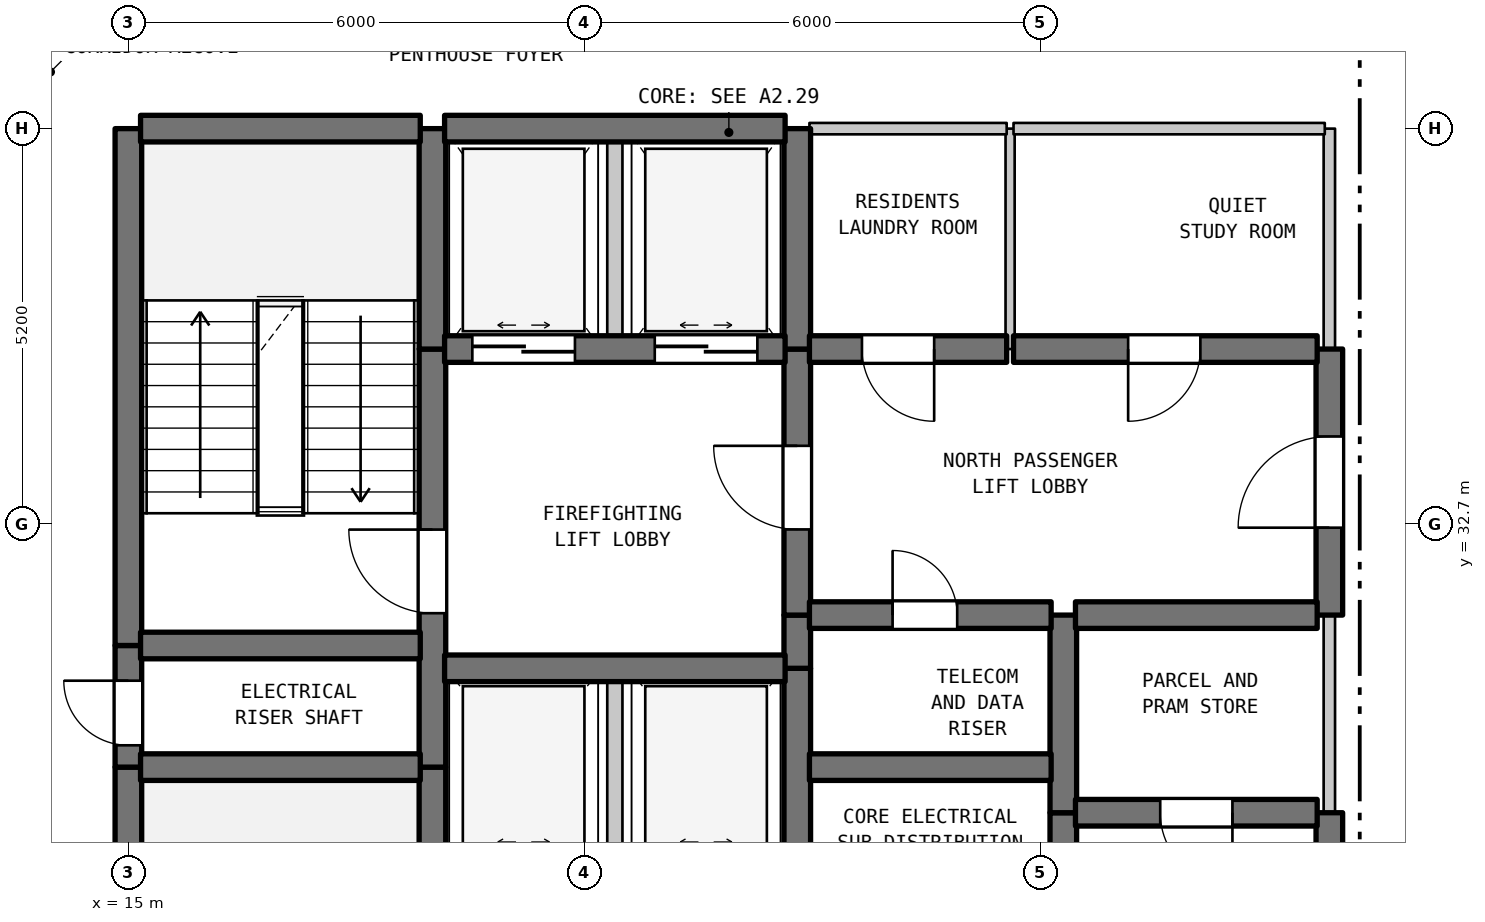
"""IFC4 building model, lengths in metres.
Left out: names, types, materials, properties, quantities, classifications, styles, units other than length and angle.
Written with IfcOpenShell. Run it as: python <this file> out.ifc"""

import sys

from ifc_helpers import new_model, si_unit, direction, frame, frame_2d, origin, place, context, subcontext, project, spatial, rectangle, extrude, element, fill, save


model = new_model("IFC4")
c1 = context("Model", 3, precision=1e-05, world=origin(), true_north=direction((0.0, 1.0)))
c2 = subcontext(c1, "Body", "Model", "MODEL_VIEW")
j1 = project(units=[si_unit("LENGTHUNIT", "METRE"), si_unit("PLANEANGLEUNIT", "RADIAN")], contexts=[c1])
p1 = place(None, origin())
s1 = spatial("IfcSite", under=j1, at=p1, CompositionType="ELEMENT")
p2 = place(p1, origin())
s2 = spatial("IfcBuilding", under=s1, at=p2, CompositionType="ELEMENT")
p3 = place(p2, frame((0.0, 0.0, 307.3)))
s3 = spatial("IfcBuildingStorey", under=s2, at=p3, CompositionType="ELEMENT", Elevation=307.3)
p4 = place(p3, frame((15.0, 22.7, 0.0), z_axis=(0.0, 0.0, 1.0), x_axis=(0.0, 1.0, 0.0)))
e1 = element("IfcWall", 1, at=p4, inside=s3, PredefinedType="SHEAR", context=c2, shape_type="SweptSolid", body=[
    extrude(rectangle(XDim=6.8, YDim=0.35, at=frame_2d((3.4, 0.0))), origin(), (0.0, 0.0, 1.0), 3.39),
])
p5 = place(p3, frame((15.0, 29.5, 0.0), z_axis=(0.0, 0.0, 1.0), x_axis=(0.0, 1.0, 0.0)))
e2 = element("IfcWall", 2, at=p5, inside=s3, PredefinedType="SHEAR", context=c2, shape_type="SweptSolid", body=[
    extrude(rectangle(XDim=1.6, YDim=0.35, at=frame_2d((0.8, 0.0))), origin(), (0.0, 0.0, 1.0), 3.39),
])
p6 = place(p5, frame((0.287, 0.0, 0.0)))
e3 = element("IfcOpeningElement", 3, at=p6, cuts=e2, PredefinedType="OPENING", context=c2, shape_type="SweptSolid", body=[
    extrude(rectangle(XDim=0.85, YDim=2.1, at=frame_2d((0.425, 1.05))), frame((0.0, 0.185, 0.0), z_axis=(0.0, -1.0, 0.0), x_axis=(1.0, 0.0, 0.0)), (0.0, 0.0, 1.0), 0.37),
])
p7 = place(p3, frame((15.0, 31.1, 0.0), z_axis=(0.0, 0.0, 1.0), x_axis=(0.0, 1.0, 0.0)))
e4 = element("IfcWall", 4, at=p7, inside=s3, PredefinedType="SHEAR", context=c2, shape_type="SweptSolid", body=[
    extrude(rectangle(XDim=6.8, YDim=0.35, at=frame_2d((3.4, 0.0))), origin(), (0.0, 0.0, 1.0), 3.39),
])
p8 = place(p3, frame((19.0, 28.2, 0.0), z_axis=(0.0, 0.0, 1.0), x_axis=(0.0, 1.0, 0.0)))
e5 = element("IfcWall", 5, at=p8, inside=s3, PredefinedType="SHEAR", context=c2, shape_type="SweptSolid", body=[
    extrude(rectangle(XDim=1.3, YDim=0.35, at=frame_2d((0.65, 0.0))), origin(), (0.0, 0.0, 1.0), 3.39),
])
p9 = place(p3, frame((19.0, 29.5, 0.0), z_axis=(0.0, 0.0, 1.0), x_axis=(0.0, 1.0, 0.0)))
e6 = element("IfcWall", 6, at=p9, inside=s3, PredefinedType="SHEAR", context=c2, shape_type="SweptSolid", body=[
    extrude(rectangle(XDim=5.5, YDim=0.35, at=frame_2d((2.75, 0.0))), origin(), (0.0, 0.0, 1.0), 3.39),
])
p10 = place(p9, frame((2.025, 0.0, 0.0)))
e7 = element("IfcOpeningElement", 7, at=p10, cuts=e6, PredefinedType="OPENING", context=c2, shape_type="SweptSolid", body=[
    extrude(rectangle(XDim=1.1, YDim=2.15, at=frame_2d((0.55, 1.075))), frame((0.0, 0.185, 0.0), z_axis=(0.0, -1.0, 0.0), x_axis=(1.0, 0.0, 0.0)), (0.0, 0.0, 1.0), 0.37),
])
p11 = place(p3, frame((19.0, 35.0, 0.0), z_axis=(0.0, 0.0, 1.0), x_axis=(0.0, 1.0, 0.0)))
e8 = element("IfcWall", 8, at=p11, inside=s3, PredefinedType="SHEAR", context=c2, shape_type="SweptSolid", body=[
    extrude(rectangle(XDim=2.9, YDim=0.35, at=frame_2d((1.45, 0.0))), origin(), (0.0, 0.0, 1.0), 3.39),
])
p12 = place(p3, frame((21.4, 28.2, 0.0), z_axis=(0.0, 0.0, 1.0), x_axis=(0.0, 1.0, 0.0)))
e9 = element("IfcWall", 9, at=p12, inside=s3, PredefinedType="STANDARD", context=c2, shape_type="SweptSolid", body=[
    extrude(rectangle(XDim=2.6, YDim=0.2, at=frame_2d((1.3, 0.0))), origin(), (0.0, 0.0, 1.0), 3.39),
])
p13 = place(p3, frame((21.4, 35.0, 0.0), z_axis=(0.0, 0.0, 1.0), x_axis=(0.0, 1.0, 0.0)))
e10 = element("IfcWall", 10, at=p13, inside=s3, PredefinedType="STANDARD", context=c2, shape_type="SweptSolid", body=[
    extrude(rectangle(XDim=2.9, YDim=0.2, at=frame_2d((1.45, 0.0))), origin(), (0.0, 0.0, 1.0), 3.39),
])
p14 = place(p3, frame((23.8, 28.2, 0.0), z_axis=(0.0, 0.0, 1.0), x_axis=(0.0, 1.0, 0.0)))
e11 = element("IfcWall", 11, at=p14, inside=s3, PredefinedType="SHEAR", context=c2, shape_type="SweptSolid", body=[
    extrude(rectangle(XDim=2.6, YDim=0.35, at=frame_2d((1.3, 0.0))), origin(), (0.0, 0.0, 1.0), 3.39),
])
p15 = place(p3, frame((23.8, 30.8, 0.0), z_axis=(0.0, 0.0, 1.0), x_axis=(0.0, 1.0, 0.0)))
e12 = element("IfcWall", 12, at=p15, inside=s3, PredefinedType="SHEAR", context=c2, shape_type="SweptSolid", body=[
    extrude(rectangle(XDim=0.7, YDim=0.35, at=frame_2d((0.35, 0.0))), origin(), (0.0, 0.0, 1.0), 3.39),
])
p16 = place(p3, frame((23.8, 31.5, 0.0), z_axis=(0.0, 0.0, 1.0), x_axis=(0.0, 1.0, 0.0)))
e13 = element("IfcWall", 13, at=p16, inside=s3, PredefinedType="SHEAR", context=c2, shape_type="SweptSolid", body=[
    extrude(rectangle(XDim=3.5, YDim=0.35, at=frame_2d((1.75, 0.0))), origin(), (0.0, 0.0, 1.0), 3.39),
])
p17 = place(p16, frame((1.127, 0.0, 0.0)))
e14 = element("IfcOpeningElement", 14, at=p17, cuts=e13, PredefinedType="OPENING", context=c2, shape_type="SweptSolid", body=[
    extrude(rectangle(XDim=1.1, YDim=2.15, at=frame_2d((0.55, 1.075))), frame((0.0, 0.185, 0.0), z_axis=(0.0, -1.0, 0.0), x_axis=(1.0, 0.0, 0.0)), (0.0, 0.0, 1.0), 0.37),
])
p18 = place(p3, frame((23.8, 35.0, 0.0), z_axis=(0.0, 0.0, 1.0), x_axis=(0.0, 1.0, 0.0)))
e15 = element("IfcWall", 15, at=p18, inside=s3, PredefinedType="SHEAR", context=c2, shape_type="SweptSolid", body=[
    extrude(rectangle(XDim=2.9, YDim=0.35, at=frame_2d((1.45, 0.0))), origin(), (0.0, 0.0, 1.0), 3.39),
])
p19 = place(p3, frame((26.6, 35.0, 0.0), z_axis=(0.0, 0.0, 1.0), x_axis=(0.0, 1.0, 0.0)))
e16 = element("IfcWall", 16, at=p19, inside=s3, PredefinedType="PARTITIONING", context=c2, shape_type="SweptSolid", body=[
    extrude(rectangle(XDim=2.9, YDim=0.12, at=frame_2d((1.45, 0.0))), origin(), (0.0, 0.0, 1.0), 3.39),
])
p20 = place(p3, frame((27.3, 26.1, 0.0), z_axis=(0.0, 0.0, 1.0), x_axis=(0.0, 1.0, 0.0)))
e17 = element("IfcWall", 17, at=p20, inside=s3, PredefinedType="SHEAR", context=c2, shape_type="SweptSolid", body=[
    extrude(rectangle(XDim=2.8, YDim=0.35, at=frame_2d((1.4, 0.0))), origin(), (0.0, 0.0, 1.0), 3.39),
])
p21 = place(p3, frame((27.3, 28.9, 0.0), z_axis=(0.0, 0.0, 1.0), x_axis=(0.0, 1.0, 0.0)))
e18 = element("IfcWall", 18, at=p21, inside=s3, PredefinedType="SHEAR", context=c2, shape_type="SweptSolid", body=[
    extrude(rectangle(XDim=2.6, YDim=0.35, at=frame_2d((1.3, 0.0))), origin(), (0.0, 0.0, 1.0), 3.39),
])
p22 = place(p3, frame((30.8, 25.6, 0.0), z_axis=(0.0, 0.0, 1.0), x_axis=(0.0, 1.0, 0.0)))
e19 = element("IfcWall", 19, at=p22, inside=s3, PredefinedType="SHEAR", context=c2, shape_type="SweptSolid", body=[
    extrude(rectangle(XDim=3.3, YDim=0.35, at=frame_2d((1.65, 0.0))), origin(), (0.0, 0.0, 1.0), 3.39),
])
p23 = place(p22, frame((0.978, 0.0, 0.0)))
e20 = element("IfcOpeningElement", 20, at=p23, cuts=e19, PredefinedType="OPENING", context=c2, shape_type="SweptSolid", body=[
    extrude(rectangle(XDim=1.2, YDim=2.2, at=frame_2d((0.6, 1.1))), frame((0.0, 0.185, 0.0), z_axis=(0.0, -1.0, 0.0), x_axis=(1.0, 0.0, 0.0)), (0.0, 0.0, 1.0), 0.37),
])
p24 = place(p3, frame((30.8, 28.9, 0.0), z_axis=(0.0, 0.0, 1.0), x_axis=(0.0, 1.0, 0.0)))
e21 = element("IfcWall", 21, at=p24, inside=s3, PredefinedType="STANDARD", context=c2, shape_type="SweptSolid", body=[
    extrude(rectangle(XDim=2.6, YDim=0.15, at=frame_2d((1.3, 0.0))), origin(), (0.0, 0.0, 1.0), 3.39),
])
p25 = place(p3, frame((30.8, 31.5, 0.0), z_axis=(0.0, 0.0, 1.0), x_axis=(0.0, 1.0, 0.0)))
e22 = element("IfcWall", 22, at=p25, inside=s3, PredefinedType="SHEAR", context=c2, shape_type="SweptSolid", body=[
    extrude(rectangle(XDim=3.5, YDim=0.35, at=frame_2d((1.75, 0.0))), origin(), (0.0, 0.0, 1.0), 3.39),
])
p26 = place(p25, frame((1.15, 0.0, 0.0)))
e23 = element("IfcOpeningElement", 23, at=p26, cuts=e22, PredefinedType="OPENING", context=c2, shape_type="SweptSolid", body=[
    extrude(rectangle(XDim=1.2, YDim=2.2, at=frame_2d((0.6, 1.1))), frame((0.0, 0.185, 0.0), z_axis=(0.0, -1.0, 0.0), x_axis=(1.0, 0.0, 0.0)), (0.0, 0.0, 1.0), 0.37),
])
p27 = place(p3, frame((30.8, 35.0, 0.0), z_axis=(0.0, 0.0, 1.0), x_axis=(0.0, 1.0, 0.0)))
e24 = element("IfcWall", 24, at=p27, inside=s3, PredefinedType="STANDARD", context=c2, shape_type="SweptSolid", body=[
    extrude(rectangle(XDim=2.9, YDim=0.15, at=frame_2d((1.45, 0.0))), origin(), (0.0, 0.0, 1.0), 3.39),
])
p28 = place(p3, frame((27.46, 28.9, 0.0), z_axis=(0.0, 0.0, 1.0), x_axis=(1.0, 0.0, 0.0)))
e25 = element("IfcWall", 25, at=p28, inside=s3, PredefinedType="SHEAR", context=c2, shape_type="SweptSolid", body=[
    extrude(rectangle(XDim=3.18, YDim=0.35, at=frame_2d((1.59, 0.0))), origin(), (0.0, 0.0, 1.0), 3.39),
])
p29 = place(p28, frame((1.115, 0.0, 0.0)))
e26 = element("IfcOpeningElement", 26, at=p29, cuts=e25, PredefinedType="OPENING", context=c2, shape_type="SweptSolid", body=[
    extrude(rectangle(XDim=0.95, YDim=2.15, at=frame_2d((0.475, 1.075))), frame((0.0, 0.185, 0.0), z_axis=(0.0, -1.0, 0.0), x_axis=(1.0, 0.0, 0.0)), (0.0, 0.0, 1.0), 0.37),
])
p30 = place(p3, frame((15.16, 29.5, 0.0), z_axis=(0.0, 0.0, 1.0), x_axis=(1.0, 0.0, 0.0)))
e27 = element("IfcWall", 27, at=p30, inside=s3, PredefinedType="SHEAR", context=c2, shape_type="SweptSolid", body=[
    extrude(rectangle(XDim=3.68, YDim=0.35, at=frame_2d((1.84, 0.0))), origin(), (0.0, 0.0, 1.0), 3.39),
])
p31 = place(p3, frame((23.96, 29.5, 0.0), z_axis=(0.0, 0.0, 1.0), x_axis=(1.0, 0.0, 0.0)))
e28 = element("IfcWall", 28, at=p31, inside=s3, PredefinedType="SHEAR", context=c2, shape_type="SweptSolid", body=[
    extrude(rectangle(XDim=3.18, YDim=0.35, at=frame_2d((1.59, 0.0))), origin(), (0.0, 0.0, 1.0), 3.39),
])
p32 = place(p3, frame((19.16, 30.8, 0.0), z_axis=(0.0, 0.0, 1.0), x_axis=(1.0, 0.0, 0.0)))
e29 = element("IfcWall", 29, at=p32, inside=s3, PredefinedType="SHEAR", context=c2, shape_type="SweptSolid", body=[
    extrude(rectangle(XDim=4.48, YDim=0.35, at=frame_2d((2.24, 0.0))), origin(), (0.0, 0.0, 1.0), 3.39),
])
p33 = place(p3, frame((15.16, 31.1, 0.0), z_axis=(0.0, 0.0, 1.0), x_axis=(1.0, 0.0, 0.0)))
e30 = element("IfcWall", 30, at=p33, inside=s3, PredefinedType="SHEAR", context=c2, shape_type="SweptSolid", body=[
    extrude(rectangle(XDim=3.68, YDim=0.35, at=frame_2d((1.84, 0.0))), origin(), (0.0, 0.0, 1.0), 3.39),
])
p34 = place(p3, frame((23.96, 31.5, 0.0), z_axis=(0.0, 0.0, 1.0), x_axis=(1.0, 0.0, 0.0)))
e31 = element("IfcWall", 31, at=p34, inside=s3, PredefinedType="SHEAR", context=c2, shape_type="SweptSolid", body=[
    extrude(rectangle(XDim=3.18, YDim=0.35, at=frame_2d((1.59, 0.0))), origin(), (0.0, 0.0, 1.0), 3.39),
])
p35 = place(p34, frame((1.094, 0.0, 0.0)))
e32 = element("IfcOpeningElement", 32, at=p35, cuts=e31, PredefinedType="OPENING", context=c2, shape_type="SweptSolid", body=[
    extrude(rectangle(XDim=0.85, YDim=2.1, at=frame_2d((0.425, 1.05))), frame((0.0, 0.185, 0.0), z_axis=(0.0, -1.0, 0.0), x_axis=(1.0, 0.0, 0.0)), (0.0, 0.0, 1.0), 0.37),
])
p36 = place(p3, frame((27.46, 31.5, 0.0), z_axis=(0.0, 0.0, 1.0), x_axis=(1.0, 0.0, 0.0)))
e33 = element("IfcWall", 33, at=p36, inside=s3, PredefinedType="SHEAR", context=c2, shape_type="SweptSolid", body=[
    extrude(rectangle(XDim=3.18, YDim=0.35, at=frame_2d((1.59, 0.0))), origin(), (0.0, 0.0, 1.0), 3.39),
])
p37 = place(p3, frame((19.16, 35.0, 0.0), z_axis=(0.0, 0.0, 1.0), x_axis=(1.0, 0.0, 0.0)))
e34 = element("IfcWall", 34, at=p37, inside=s3, PredefinedType="SHEAR", context=c2, shape_type="SweptSolid", body=[
    extrude(rectangle(XDim=4.48, YDim=0.35, at=frame_2d((2.24, 0.0))), origin(), (0.0, 0.0, 1.0), 3.39),
])
p38 = place(p37, frame((0.365, 0.0, 0.0)))
e35 = element("IfcOpeningElement", 35, at=p38, cuts=e34, PredefinedType="OPENING", context=c2, shape_type="SweptSolid", body=[
    extrude(rectangle(XDim=1.35, YDim=2.2, at=frame_2d((0.675, 1.1))), frame((0.0, 0.185, 0.0), z_axis=(0.0, -1.0, 0.0), x_axis=(1.0, 0.0, 0.0)), (0.0, 0.0, 1.0), 0.37),
])
p39 = place(p37, frame((2.765, 0.0, 0.0)))
e36 = element("IfcOpeningElement", 36, at=p39, cuts=e34, PredefinedType="OPENING", context=c2, shape_type="SweptSolid", body=[
    extrude(rectangle(XDim=1.35, YDim=2.2, at=frame_2d((0.675, 1.1))), frame((0.0, 0.185, 0.0), z_axis=(0.0, -1.0, 0.0), x_axis=(1.0, 0.0, 0.0)), (0.0, 0.0, 1.0), 0.37),
])
p40 = place(p3, frame((23.96, 35.0, 0.0), z_axis=(0.0, 0.0, 1.0), x_axis=(1.0, 0.0, 0.0)))
e37 = element("IfcWall", 37, at=p40, inside=s3, PredefinedType="SHEAR", context=c2, shape_type="SweptSolid", body=[
    extrude(rectangle(XDim=2.595, YDim=0.35, at=frame_2d((1.297, 0.0))), origin(), (0.0, 0.0, 1.0), 3.39),
])
p41 = place(p40, frame((0.691, 0.0, 0.0)))
e38 = element("IfcOpeningElement", 38, at=p41, cuts=e37, PredefinedType="OPENING", context=c2, shape_type="SweptSolid", body=[
    extrude(rectangle(XDim=0.95, YDim=2.15, at=frame_2d((0.475, 1.075))), frame((0.0, 0.185, 0.0), z_axis=(0.0, -1.0, 0.0), x_axis=(1.0, 0.0, 0.0)), (0.0, 0.0, 1.0), 0.37),
])
p42 = place(p3, frame((26.645, 35.0, 0.0), z_axis=(0.0, 0.0, 1.0), x_axis=(1.0, 0.0, 0.0)))
e39 = element("IfcWall", 39, at=p42, inside=s3, PredefinedType="SHEAR", context=c2, shape_type="SweptSolid", body=[
    extrude(rectangle(XDim=3.995, YDim=0.35, at=frame_2d((1.998, 0.0))), origin(), (0.0, 0.0, 1.0), 3.39),
])
p43 = place(p42, frame((1.508, 0.0, 0.0)))
e40 = element("IfcOpeningElement", 40, at=p43, cuts=e39, PredefinedType="OPENING", context=c2, shape_type="SweptSolid", body=[
    extrude(rectangle(XDim=0.95, YDim=2.15, at=frame_2d((0.475, 1.075))), frame((0.0, 0.185, 0.0), z_axis=(0.0, -1.0, 0.0), x_axis=(1.0, 0.0, 0.0)), (0.0, 0.0, 1.0), 0.37),
])
p44 = place(p3, frame((15.16, 37.9, 0.0), z_axis=(0.0, 0.0, 1.0), x_axis=(1.0, 0.0, 0.0)))
e41 = element("IfcWall", 41, at=p44, inside=s3, PredefinedType="SHEAR", context=c2, shape_type="SweptSolid", body=[
    extrude(rectangle(XDim=3.68, YDim=0.35, at=frame_2d((1.84, 0.0))), origin(), (0.0, 0.0, 1.0), 3.39),
])
p45 = place(p3, frame((19.16, 37.9, 0.0), z_axis=(0.0, 0.0, 1.0), x_axis=(1.0, 0.0, 0.0)))
e42 = element("IfcWall", 42, at=p45, inside=s3, PredefinedType="SHEAR", context=c2, shape_type="SweptSolid", body=[
    extrude(rectangle(XDim=4.48, YDim=0.35, at=frame_2d((2.24, 0.0))), origin(), (0.0, 0.0, 1.0), 3.39),
])
p46 = place(p3, frame((23.96, 37.9, 0.0), z_axis=(0.0, 0.0, 1.0), x_axis=(1.0, 0.0, 0.0)))
e43 = element("IfcWall", 43, at=p46, inside=s3, PredefinedType="STANDARD", context=c2, shape_type="SweptSolid", body=[
    extrude(rectangle(XDim=2.595, YDim=0.15, at=frame_2d((1.297, 0.0))), origin(), (0.0, 0.0, 1.0), 2.89),
])
p47 = place(p3, frame((26.645, 37.9, 0.0), z_axis=(0.0, 0.0, 1.0), x_axis=(1.0, 0.0, 0.0)))
e44 = element("IfcWall", 44, at=p47, inside=s3, PredefinedType="STANDARD", context=c2, shape_type="SweptSolid", body=[
    extrude(rectangle(XDim=4.095, YDim=0.15, at=frame_2d((2.047, 0.0))), origin(), (0.0, 0.0, 1.0), 2.89),
])
p48 = place(p6, origin())
e45 = element("IfcDoor", 45, at=p48, inside=s3, OperationType="SINGLE_SWING_RIGHT", PredefinedType="DOOR", context=c2, shape_type="SweptSolid", body=[
    extrude(rectangle(XDim=0.85, YDim=2.1, at=frame_2d((0.425, 1.05))), frame((0.0, 0.025, 0.0), z_axis=(0.0, -1.0, 0.0), x_axis=(1.0, 0.0, 0.0)), (0.0, 0.0, 1.0), 0.05),
])
fill(e3, e45)
p49 = place(p10, origin())
e46 = element("IfcDoor", 46, at=p49, inside=s3, OperationType="SINGLE_SWING_RIGHT", PredefinedType="DOOR", context=c2, shape_type="SweptSolid", body=[
    extrude(rectangle(XDim=1.1, YDim=2.15, at=frame_2d((0.55, 1.075))), frame((0.0, 0.025, 0.0), z_axis=(0.0, -1.0, 0.0), x_axis=(1.0, 0.0, 0.0)), (0.0, 0.0, 1.0), 0.05),
])
fill(e7, e46)
p50 = place(p17, origin())
e47 = element("IfcDoor", 47, at=p50, inside=s3, OperationType="SINGLE_SWING_RIGHT", PredefinedType="DOOR", context=c2, shape_type="SweptSolid", body=[
    extrude(rectangle(XDim=1.1, YDim=2.15, at=frame_2d((0.55, 1.075))), frame((0.0, 0.025, 0.0), z_axis=(0.0, -1.0, 0.0), x_axis=(1.0, 0.0, 0.0)), (0.0, 0.0, 1.0), 0.05),
])
fill(e14, e47)
p51 = place(p26, origin())
e48 = element("IfcDoor", 48, at=p51, inside=s3, OperationType="SINGLE_SWING_LEFT", PredefinedType="DOOR", context=c2, shape_type="SweptSolid", body=[
    extrude(rectangle(XDim=1.2, YDim=2.2, at=frame_2d((0.6, 1.1))), frame((0.0, 0.025, 0.0), z_axis=(0.0, -1.0, 0.0), x_axis=(1.0, 0.0, 0.0)), (0.0, 0.0, 1.0), 0.05),
])
fill(e23, e48)
p52 = place(p29, frame((0.95, 0.0, 0.0), z_axis=(0.0, 0.0, 1.0), x_axis=(-1.0, 0.0, 0.0)))
e49 = element("IfcDoor", 49, at=p52, inside=s3, OperationType="SINGLE_SWING_RIGHT", PredefinedType="DOOR", context=c2, shape_type="SweptSolid", body=[
    extrude(rectangle(XDim=0.95, YDim=2.15, at=frame_2d((0.475, 1.075))), frame((0.0, 0.025, 0.0), z_axis=(0.0, -1.0, 0.0), x_axis=(1.0, 0.0, 0.0)), (0.0, 0.0, 1.0), 0.05),
])
fill(e26, e49)
p53 = place(p35, origin())
e50 = element("IfcDoor", 50, at=p53, inside=s3, OperationType="SINGLE_SWING_LEFT", PredefinedType="DOOR", context=c2, shape_type="SweptSolid", body=[
    extrude(rectangle(XDim=0.85, YDim=2.1, at=frame_2d((0.425, 1.05))), frame((0.0, 0.025, 0.0), z_axis=(0.0, -1.0, 0.0), x_axis=(1.0, 0.0, 0.0)), (0.0, 0.0, 1.0), 0.05),
])
fill(e32, e50)
p54 = place(p38, origin())
e51 = element("IfcDoor", 51, at=p54, inside=s3, OperationType="DOUBLE_DOOR_SLIDING", PredefinedType="DOOR", context=c2, shape_type="SweptSolid", body=[
    extrude(rectangle(XDim=1.35, YDim=2.2, at=frame_2d((0.675, 1.1))), frame((0.0, 0.025, 0.0), z_axis=(0.0, -1.0, 0.0), x_axis=(1.0, 0.0, 0.0)), (0.0, 0.0, 1.0), 0.05),
])
fill(e35, e51)
p55 = place(p39, origin())
e52 = element("IfcDoor", 52, at=p55, inside=s3, OperationType="DOUBLE_DOOR_SLIDING", PredefinedType="DOOR", context=c2, shape_type="SweptSolid", body=[
    extrude(rectangle(XDim=1.35, YDim=2.2, at=frame_2d((0.675, 1.1))), frame((0.0, 0.025, 0.0), z_axis=(0.0, -1.0, 0.0), x_axis=(1.0, 0.0, 0.0)), (0.0, 0.0, 1.0), 0.05),
])
fill(e36, e52)
p56 = place(p41, frame((0.95, 0.0, 0.0), z_axis=(0.0, 0.0, 1.0), x_axis=(-1.0, 0.0, 0.0)))
e53 = element("IfcDoor", 53, at=p56, inside=s3, OperationType="SINGLE_SWING_RIGHT", PredefinedType="DOOR", context=c2, shape_type="SweptSolid", body=[
    extrude(rectangle(XDim=0.95, YDim=2.15, at=frame_2d((0.475, 1.075))), frame((0.0, 0.025, 0.0), z_axis=(0.0, -1.0, 0.0), x_axis=(1.0, 0.0, 0.0)), (0.0, 0.0, 1.0), 0.05),
])
fill(e38, e53)
p57 = place(p43, frame((0.95, 0.0, 0.0), z_axis=(0.0, 0.0, 1.0), x_axis=(-1.0, 0.0, 0.0)))
e54 = element("IfcDoor", 54, at=p57, inside=s3, OperationType="SINGLE_SWING_LEFT", PredefinedType="DOOR", context=c2, shape_type="SweptSolid", body=[
    extrude(rectangle(XDim=0.95, YDim=2.15, at=frame_2d((0.475, 1.075))), frame((0.0, 0.025, 0.0), z_axis=(0.0, -1.0, 0.0), x_axis=(1.0, 0.0, 0.0)), (0.0, 0.0, 1.0), 0.05),
])
fill(e40, e54)
save(model, sys.argv[1])
